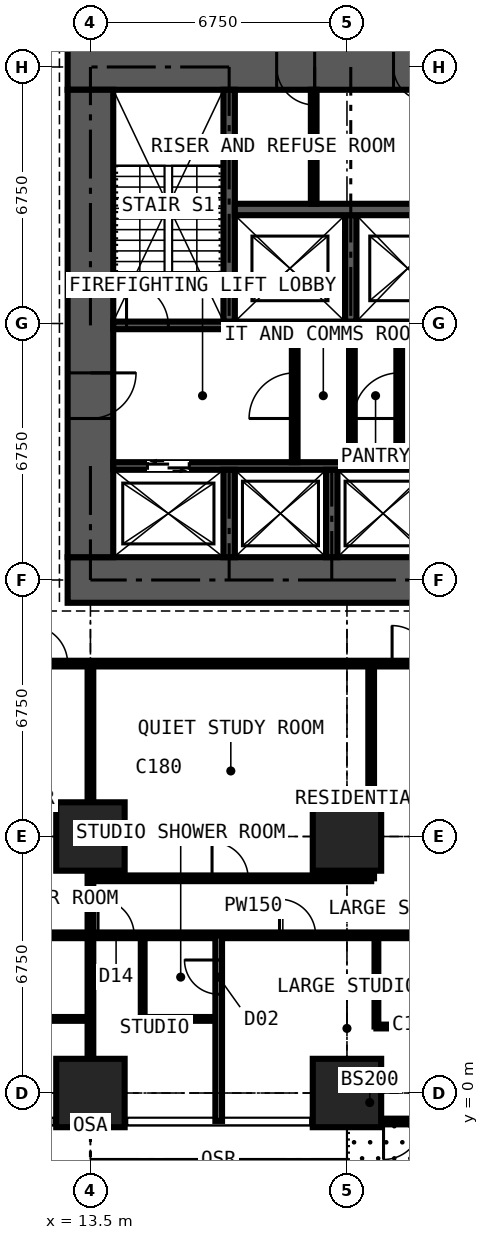
"""IFC4 building model, lengths in metres.
Left out: names, types, materials, properties, quantities, classifications, styles, units other than length and angle.
Written with IfcOpenShell. Run it as: python <this file> out.ifc"""

import sys

from ifc_helpers import new_model, si_unit, direction, frame, frame_2d, origin, origin_2d, place, context, subcontext, project, spatial, rectangle, extrude, element, fill, save


model = new_model("IFC4")
c1 = context("Model", 3, precision=1e-05, world=origin(), true_north=direction((0.0, 1.0)))
c2 = subcontext(c1, "Body", "Model", "MODEL_VIEW")
j1 = project(units=[si_unit("LENGTHUNIT", "METRE"), si_unit("PLANEANGLEUNIT", "RADIAN")], contexts=[c1])
p1 = place(None, origin())
s1 = spatial("IfcSite", under=j1, at=p1, CompositionType="ELEMENT")
p2 = place(p1, origin())
s2 = spatial("IfcBuilding", under=s1, at=p2, CompositionType="ELEMENT")
p3 = place(p2, frame((0.0, 0.0, 50.4)))
s3 = spatial("IfcBuildingStorey", under=s2, at=p3, CompositionType="ELEMENT", Elevation=50.4)
for number, where, z_axis, x_axis in (
    (1, (13.5, 0.0, 0.0), (0.0, 0.0, 1.0), (1.0, 0.0, 0.0)),
    (2, (13.5, 6.75, 0.0), (0.0, 0.0, 1.0), (1.0, 0.0, 0.0)),
    (3, (20.25, 0.0, 0.0), (0.0, 0.0, 1.0), (1.0, 0.0, 0.0)),
    (4, (20.25, 6.75, 0.0), (0.0, 0.0, 1.0), (1.0, 0.0, 0.0)),
):
    element("IfcColumn", number, at=place(p3, frame(where, z_axis=z_axis, x_axis=x_axis)), inside=s3, PredefinedType="COLUMN", context=c2, shape_type="SweptSolid", body=[
        extrude(rectangle(XDim=1.8, YDim=1.8, at=origin_2d()), origin(), (0.0, 0.0, 1.0), 3.6),
    ])
p4 = place(p3, frame((12.9, 13.5, 0.0), z_axis=(0.0, 0.0, 1.0), x_axis=(1.0, 0.0, 0.0)))
e5 = element("IfcWall", 5, at=p4, inside=s3, PredefinedType="SHEAR", context=c2, shape_type="SweptSolid", body=[
    extrude(rectangle(XDim=14.7, YDim=1.2, at=frame_2d((7.35, 0.0))), origin(), (0.0, 0.0, 1.0), 3.6),
])
p5 = place(p3, frame((27.6, 27.0, 0.0), z_axis=(0.0, 0.0, 1.0), x_axis=(-1.0, 0.0, 0.0)))
e6 = element("IfcWall", 6, at=p5, inside=s3, PredefinedType="SHEAR", context=c2, shape_type="SweptSolid", body=[
    extrude(rectangle(XDim=14.7, YDim=1.2, at=frame_2d((7.35, 0.0))), origin(), (0.0, 0.0, 1.0), 3.6),
])
p6 = place(p5, frame((5.225, 0.0, 0.0)))
e7 = element("IfcOpeningElement", 7, at=p6, cuts=e6, PredefinedType="OPENING", context=c2, shape_type="SweptSolid", body=[
    extrude(rectangle(XDim=0.9, YDim=2.2, at=frame_2d((0.45, 1.1))), frame((0.0, 0.61, 0.0), z_axis=(0.0, -1.0, 0.0), x_axis=(1.0, 0.0, 0.0)), (0.0, 0.0, 1.0), 1.22),
])
p7 = place(p5, frame((8.2, 0.0, 0.0)))
e8 = element("IfcOpeningElement", 8, at=p7, cuts=e6, PredefinedType="OPENING", context=c2, shape_type="SweptSolid", body=[
    extrude(rectangle(XDim=1.0, YDim=2.2, at=frame_2d((0.5, 1.1))), frame((0.0, 0.61, 0.0), z_axis=(0.0, -1.0, 0.0), x_axis=(1.0, 0.0, 0.0)), (0.0, 0.0, 1.0), 1.22),
])
p8 = place(p3, frame((13.5, 26.4, 0.0), z_axis=(0.0, 0.0, 1.0), x_axis=(0.0, -1.0, 0.0)))
e9 = element("IfcWall", 9, at=p8, inside=s3, PredefinedType="SHEAR", context=c2, shape_type="SweptSolid", body=[
    extrude(rectangle(XDim=12.3, YDim=1.2, at=frame_2d((6.15, 0.0))), origin(), (0.0, 0.0, 1.0), 3.6),
])
p9 = place(p8, frame((7.45, 0.0, 0.0)))
e10 = element("IfcOpeningElement", 10, at=p9, cuts=e9, PredefinedType="OPENING", context=c2, shape_type="SweptSolid", body=[
    extrude(rectangle(XDim=1.2, YDim=2.2, at=frame_2d((0.6, 1.1))), frame((0.0, 0.61, 0.0), z_axis=(0.0, -1.0, 0.0), x_axis=(1.0, 0.0, 0.0)), (0.0, 0.0, 1.0), 1.22),
])
p10 = place(p3, frame((27.0, -0.75, 0.0), z_axis=(0.0, 0.0, 1.0), x_axis=(-1.0, 0.0, 0.0)))
e11 = element("IfcWall", 11, at=p10, inside=s3, PredefinedType="SOLIDWALL", context=c2, shape_type="SweptSolid", body=[
    extrude(rectangle(XDim=6.75, YDim=0.15, at=frame_2d((3.375, 0.0))), origin(), (0.0, 0.0, 1.0), 3.375),
])
p11 = place(p10, frame((0.962, 0.0, 0.0)))
e12 = element("IfcOpeningElement", 12, at=p11, cuts=e11, PredefinedType="OPENING", context=c2, shape_type="SweptSolid", body=[
    extrude(rectangle(XDim=1.0, YDim=2.2, at=frame_2d((0.5, 1.1))), frame((0.0, 0.085, 0.0), z_axis=(0.0, -1.0, 0.0), x_axis=(1.0, 0.0, 0.0)), (0.0, 0.0, 1.0), 0.17),
])
p12 = place(p10, frame((2.025, 0.0, 0.9)))
e13 = element("IfcOpeningElement", 13, at=p12, cuts=e11, PredefinedType="OPENING", context=c2, shape_type="SweptSolid", body=[
    extrude(rectangle(XDim=1.2, YDim=1.8, at=frame_2d((0.6, 0.9))), frame((0.0, 0.085, 0.0), z_axis=(0.0, -1.0, 0.0), x_axis=(1.0, 0.0, 0.0)), (0.0, 0.0, 1.0), 0.17),
])
p13 = place(p10, frame((4.788, 0.0, 0.0)))
e14 = element("IfcOpeningElement", 14, at=p13, cuts=e11, PredefinedType="OPENING", context=c2, shape_type="SweptSolid", body=[
    extrude(rectangle(XDim=1.0, YDim=2.2, at=frame_2d((0.5, 1.1))), frame((0.0, 0.085, 0.0), z_axis=(0.0, -1.0, 0.0), x_axis=(1.0, 0.0, 0.0)), (0.0, 0.0, 1.0), 0.17),
])
p14 = place(p10, frame((3.525, 0.0, 0.9)))
e15 = element("IfcOpeningElement", 15, at=p14, cuts=e11, PredefinedType="OPENING", context=c2, shape_type="SweptSolid", body=[
    extrude(rectangle(XDim=1.2, YDim=1.8, at=frame_2d((0.6, 0.9))), frame((0.0, 0.085, 0.0), z_axis=(0.0, -1.0, 0.0), x_axis=(1.0, 0.0, 0.0)), (0.0, 0.0, 1.0), 0.17),
])
p15 = place(p3, frame((14.1, 16.5, 0.0), z_axis=(0.0, 0.0, 1.0), x_axis=(1.0, 0.0, 0.0)))
e16 = element("IfcWall", 16, at=p15, inside=s3, PredefinedType="SHEAR", context=c2, shape_type="SweptSolid", body=[
    extrude(rectangle(XDim=12.3, YDim=0.2, at=frame_2d((6.15, 0.0))), origin(), (0.0, 0.0, 1.0), 3.6),
])
p16 = place(p15, frame((0.9, 0.0, 0.0)))
e17 = element("IfcOpeningElement", 17, at=p16, cuts=e16, PredefinedType="OPENING", context=c2, shape_type="SweptSolid", body=[
    extrude(rectangle(XDim=1.1, YDim=2.2, at=frame_2d((0.55, 1.1))), frame((0.0, 0.11, 0.0), z_axis=(0.0, -1.0, 0.0), x_axis=(1.0, 0.0, 0.0)), (0.0, 0.0, 1.0), 0.22),
])
p17 = place(p15, frame((9.5, 0.0, 0.0)))
e18 = element("IfcOpeningElement", 18, at=p17, cuts=e16, PredefinedType="OPENING", context=c2, shape_type="SweptSolid", body=[
    extrude(rectangle(XDim=1.1, YDim=2.2, at=frame_2d((0.55, 1.1))), frame((0.0, 0.11, 0.0), z_axis=(0.0, -1.0, 0.0), x_axis=(1.0, 0.0, 0.0)), (0.0, 0.0, 1.0), 0.22),
])
p18 = place(p3, frame((14.1, 20.2, 0.0), z_axis=(0.0, 0.0, 1.0), x_axis=(1.0, 0.0, 0.0)))
e19 = element("IfcWall", 19, at=p18, inside=s3, PredefinedType="SHEAR", context=c2, shape_type="SweptSolid", body=[
    extrude(rectangle(XDim=12.3, YDim=0.2, at=frame_2d((6.15, 0.0))), origin(), (0.0, 0.0, 1.0), 3.6),
])
p19 = place(p18, frame((0.35, 0.0, 0.0)))
e20 = element("IfcOpeningElement", 20, at=p19, cuts=e19, PredefinedType="OPENING", context=c2, shape_type="SweptSolid", body=[
    extrude(rectangle(XDim=1.1, YDim=2.2, at=frame_2d((0.55, 1.1))), frame((0.0, 0.11, 0.0), z_axis=(0.0, -1.0, 0.0), x_axis=(1.0, 0.0, 0.0)), (0.0, 0.0, 1.0), 0.22),
])
p20 = place(p18, frame((9.75, 0.0, 0.0)))
e21 = element("IfcOpeningElement", 21, at=p20, cuts=e19, PredefinedType="OPENING", context=c2, shape_type="SweptSolid", body=[
    extrude(rectangle(XDim=1.1, YDim=2.2, at=frame_2d((0.55, 1.1))), frame((0.0, 0.11, 0.0), z_axis=(0.0, -1.0, 0.0), x_axis=(1.0, 0.0, 0.0)), (0.0, 0.0, 1.0), 0.22),
])
p21 = place(p3, frame((17.15, 20.3, 0.0), z_axis=(0.0, 0.0, 1.0), x_axis=(0.0, 1.0, 0.0)))
e22 = element("IfcWall", 22, at=p21, inside=s3, PredefinedType="SHEAR", context=c2, shape_type="SweptSolid", body=[
    extrude(rectangle(XDim=6.1, YDim=0.3, at=frame_2d((3.05, 0.0))), origin(), (0.0, 0.0, 1.0), 3.6),
])
p22 = place(p3, frame((20.35, 20.3, 0.0), z_axis=(0.0, 0.0, 1.0), x_axis=(0.0, 1.0, 0.0)))
e23 = element("IfcWall", 23, at=p22, inside=s3, PredefinedType="SHEAR", context=c2, shape_type="SweptSolid", body=[
    extrude(rectangle(XDim=2.8, YDim=0.3, at=frame_2d((1.4, 0.0))), origin(), (0.0, 0.0, 1.0), 3.6),
])
p23 = place(p3, frame((17.3, 23.25, 0.0), z_axis=(0.0, 0.0, 1.0), x_axis=(1.0, 0.0, 0.0)))
e24 = element("IfcWall", 24, at=p23, inside=s3, PredefinedType="SHEAR", context=c2, shape_type="SweptSolid", body=[
    extrude(rectangle(XDim=5.9, YDim=0.3, at=frame_2d((2.95, 0.0))), origin(), (0.0, 0.0, 1.0), 3.6),
])
for number, where, z_axis, x_axis in (
    (25, (17.15, 14.1, 0.0), (0.0, 0.0, 1.0), (0.0, 1.0, 0.0)),
    (26, (19.85, 14.1, 0.0), (0.0, 0.0, 1.0), (0.0, 1.0, 0.0)),
):
    element("IfcWall", number, at=place(p3, frame(where, z_axis=z_axis, x_axis=x_axis)), inside=s3, PredefinedType="SHEAR", context=c2, shape_type="SweptSolid", body=[
        extrude(rectangle(XDim=2.3, YDim=0.3, at=frame_2d((1.15, 0.0))), origin(), (0.0, 0.0, 1.0), 3.6),
    ])
p24 = place(p3, frame((18.875, 16.6, 0.0), z_axis=(0.0, 0.0, 1.0), x_axis=(0.0, 1.0, 0.0)))
e27 = element("IfcWall", 27, at=p24, inside=s3, PredefinedType="PARTITIONING", context=c2, shape_type="SweptSolid", body=[
    extrude(rectangle(XDim=3.5, YDim=0.15, at=frame_2d((1.75, 0.0))), origin(), (0.0, 0.0, 1.0), 3.375),
])
p25 = place(p24, frame((1.15, 0.0, 0.0)))
e28 = element("IfcOpeningElement", 28, at=p25, cuts=e27, PredefinedType="OPENING", context=c2, shape_type="SweptSolid", body=[
    extrude(rectangle(XDim=1.2, YDim=2.2, at=frame_2d((0.6, 1.1))), frame((0.0, 0.085, 0.0), z_axis=(0.0, -1.0, 0.0), x_axis=(1.0, 0.0, 0.0)), (0.0, 0.0, 1.0), 0.17),
])
p26 = place(p3, frame((21.625, 16.6, 0.0), z_axis=(0.0, 0.0, 1.0), x_axis=(0.0, 1.0, 0.0)))
e29 = element("IfcWall", 29, at=p26, inside=s3, PredefinedType="PARTITIONING", context=c2, shape_type="SweptSolid", body=[
    extrude(rectangle(XDim=3.5, YDim=0.15, at=frame_2d((1.75, 0.0))), origin(), (0.0, 0.0, 1.0), 3.375),
])
p27 = place(p26, frame((1.15, 0.0, 0.0)))
e30 = element("IfcOpeningElement", 30, at=p27, cuts=e29, PredefinedType="OPENING", context=c2, shape_type="SweptSolid", body=[
    extrude(rectangle(XDim=1.2, YDim=2.2, at=frame_2d((0.6, 1.1))), frame((0.0, 0.085, 0.0), z_axis=(0.0, -1.0, 0.0), x_axis=(1.0, 0.0, 0.0)), (0.0, 0.0, 1.0), 0.17),
])
p28 = place(p3, frame((20.38, 16.6, 0.0), z_axis=(0.0, 0.0, 1.0), x_axis=(0.0, 1.0, 0.0)))
e31 = element("IfcWall", 31, at=p28, inside=s3, PredefinedType="PARTITIONING", context=c2, shape_type="SweptSolid", body=[
    extrude(rectangle(XDim=3.5, YDim=0.15, at=frame_2d((1.75, 0.0))), origin(), (0.0, 0.0, 1.0), 3.375),
])
p29 = place(p3, frame((19.375, 23.4, 0.0), z_axis=(0.0, 0.0, 1.0), x_axis=(0.0, 1.0, 0.0)))
e32 = element("IfcWall", 32, at=p29, inside=s3, PredefinedType="PARTITIONING", context=c2, shape_type="SweptSolid", body=[
    extrude(rectangle(XDim=3.0, YDim=0.15, at=frame_2d((1.5, 0.0))), origin(), (0.0, 0.0, 1.0), 3.375),
])
p30 = place(p3, frame((6.75, 4.15, 0.0), z_axis=(0.0, 0.0, 1.0), x_axis=(1.0, 0.0, 0.0)))
e33 = element("IfcWall", 33, at=p30, inside=s3, PredefinedType="PARTITIONING", context=c2, shape_type="SweptSolid", body=[
    extrude(rectangle(XDim=23.625, YDim=0.15, at=frame_2d((11.812, 0.0))), origin(), (0.0, 0.0, 1.0), 3.375),
])
p31 = place(p30, frame((0.2, 0.0, 0.0)))
e34 = element("IfcOpeningElement", 34, at=p31, cuts=e33, PredefinedType="OPENING", context=c2, shape_type="SweptSolid", body=[
    extrude(rectangle(XDim=0.95, YDim=2.2, at=frame_2d((0.475, 1.1))), frame((0.0, 0.085, 0.0), z_axis=(0.0, -1.0, 0.0), x_axis=(1.0, 0.0, 0.0)), (0.0, 0.0, 1.0), 0.17),
])
p32 = place(p30, frame((3.625, 0.0, 0.0)))
e35 = element("IfcOpeningElement", 35, at=p32, cuts=e33, PredefinedType="OPENING", context=c2, shape_type="SweptSolid", body=[
    extrude(rectangle(XDim=0.95, YDim=2.2, at=frame_2d((0.475, 1.1))), frame((0.0, 0.085, 0.0), z_axis=(0.0, -1.0, 0.0), x_axis=(1.0, 0.0, 0.0)), (0.0, 0.0, 1.0), 0.17),
])
p33 = place(p30, frame((18.475, 0.0, 0.0)))
e36 = element("IfcOpeningElement", 36, at=p33, cuts=e33, PredefinedType="OPENING", context=c2, shape_type="SweptSolid", body=[
    extrude(rectangle(XDim=0.95, YDim=2.2, at=frame_2d((0.475, 1.1))), frame((0.0, 0.085, 0.0), z_axis=(0.0, -1.0, 0.0), x_axis=(1.0, 0.0, 0.0)), (0.0, 0.0, 1.0), 0.17),
])
p34 = place(p30, frame((11.725, 0.0, 0.0)))
e37 = element("IfcOpeningElement", 37, at=p34, cuts=e33, PredefinedType="OPENING", context=c2, shape_type="SweptSolid", body=[
    extrude(rectangle(XDim=0.95, YDim=2.2, at=frame_2d((0.475, 1.1))), frame((0.0, 0.085, 0.0), z_axis=(0.0, -1.0, 0.0), x_axis=(1.0, 0.0, 0.0)), (0.0, 0.0, 1.0), 0.17),
])
p35 = place(p30, frame((6.95, 0.0, 0.0)))
e38 = element("IfcOpeningElement", 38, at=p35, cuts=e33, PredefinedType="OPENING", context=c2, shape_type="SweptSolid", body=[
    extrude(rectangle(XDim=0.95, YDim=2.2, at=frame_2d((0.475, 1.1))), frame((0.0, 0.085, 0.0), z_axis=(0.0, -1.0, 0.0), x_axis=(1.0, 0.0, 0.0)), (0.0, 0.0, 1.0), 0.17),
])
p36 = place(p3, frame((10.125, 11.3, 0.0), z_axis=(0.0, 0.0, 1.0), x_axis=(1.0, 0.0, 0.0)))
e39 = element("IfcWall", 39, at=p36, inside=s3, PredefinedType="PARTITIONING", context=c2, shape_type="SweptSolid", body=[
    extrude(rectangle(XDim=20.675, YDim=0.15, at=frame_2d((10.337, 0.0))), origin(), (0.0, 0.0, 1.0), 3.375),
])
p37 = place(p36, frame((1.775, 0.0, 0.0)))
e40 = element("IfcOpeningElement", 40, at=p37, cuts=e39, PredefinedType="OPENING", context=c2, shape_type="SweptSolid", body=[
    extrude(rectangle(XDim=1.0, YDim=2.2, at=frame_2d((0.5, 1.1))), frame((0.0, 0.085, 0.0), z_axis=(0.0, -1.0, 0.0), x_axis=(1.0, 0.0, 0.0)), (0.0, 0.0, 1.0), 0.17),
])
p38 = place(p36, frame((11.312, 0.0, 0.0)))
e41 = element("IfcOpeningElement", 41, at=p38, cuts=e39, PredefinedType="OPENING", context=c2, shape_type="SweptSolid", body=[
    extrude(rectangle(XDim=1.0, YDim=2.2, at=frame_2d((0.5, 1.1))), frame((0.0, 0.085, 0.0), z_axis=(0.0, -1.0, 0.0), x_axis=(1.0, 0.0, 0.0)), (0.0, 0.0, 1.0), 0.17),
])
p39 = place(p3, frame((11.5, 1.95, 0.0), z_axis=(0.0, 0.0, 1.0), x_axis=(1.0, 0.0, 0.0)))
e42 = element("IfcWall", 42, at=p39, inside=s3, PredefinedType="PARTITIONING", context=c2, shape_type="SweptSolid", body=[
    extrude(rectangle(XDim=2.0, YDim=0.1, at=frame_2d((1.0, 0.0))), origin(), (0.0, 0.0, 1.0), 3.375),
])
p40 = place(p3, frame((13.5, -0.734, 0.0), z_axis=(0.0, 0.0, 1.0), x_axis=(0.0, 1.0, 0.0)))
e43 = element("IfcWall", 43, at=p40, inside=s3, PredefinedType="PARTITIONING", context=c2, shape_type="SweptSolid", body=[
    extrude(rectangle(XDim=12.034, YDim=0.15, at=frame_2d((6.017, 0.0))), origin(), (0.0, 0.0, 1.0), 2.61),
])
p41 = place(p3, frame((13.5, 5.65, 0.0), z_axis=(0.0, 0.0, 1.0), x_axis=(1.0, 0.0, 0.0)))
e44 = element("IfcWall", 44, at=p41, inside=s3, PredefinedType="PARTITIONING", context=c2, shape_type="SweptSolid", body=[
    extrude(rectangle(XDim=7.387, YDim=0.15, at=frame_2d((3.694, 0.0))), origin(), (0.0, 0.0, 1.0), 3.375),
])
p42 = place(p41, frame((3.2, 0.0, 0.0)))
e45 = element("IfcOpeningElement", 45, at=p42, cuts=e44, PredefinedType="OPENING", context=c2, shape_type="SweptSolid", body=[
    extrude(rectangle(XDim=0.95, YDim=2.2, at=frame_2d((0.475, 1.1))), frame((0.0, 0.085, 0.0), z_axis=(0.0, -1.0, 0.0), x_axis=(1.0, 0.0, 0.0)), (0.0, 0.0, 1.0), 0.17),
])
p43 = place(p3, frame((14.875, 1.95, 0.0), z_axis=(0.0, 0.0, 1.0), x_axis=(0.0, 1.0, 0.0)))
e46 = element("IfcWall", 46, at=p43, inside=s3, PredefinedType="PARTITIONING", context=c2, shape_type="SweptSolid", body=[
    extrude(rectangle(XDim=2.2, YDim=0.1, at=frame_2d((1.1, 0.0))), origin(), (0.0, 0.0, 1.0), 3.375),
])
p44 = place(p3, frame((14.875, 1.95, 0.0), z_axis=(0.0, 0.0, 1.0), x_axis=(1.0, 0.0, 0.0)))
e47 = element("IfcWall", 47, at=p44, inside=s3, PredefinedType="PARTITIONING", context=c2, shape_type="SweptSolid", body=[
    extrude(rectangle(XDim=2.0, YDim=0.1, at=frame_2d((1.0, 0.0))), origin(), (0.0, 0.0, 1.0), 3.375),
])
p45 = place(p3, frame((16.875, -0.734, 0.0), z_axis=(0.0, 0.0, 1.0), x_axis=(0.0, 1.0, 0.0)))
e48 = element("IfcWall", 48, at=p45, inside=s3, PredefinedType="PARTITIONING", context=c2, shape_type="SweptSolid", body=[
    extrude(rectangle(XDim=4.884, YDim=0.175, at=frame_2d((2.442, 0.0))), origin(), (0.0, 0.0, 1.0), 3.375),
])
p46 = place(p45, frame((3.334, 0.0, 0.0)))
e49 = element("IfcOpeningElement", 49, at=p46, cuts=e48, PredefinedType="OPENING", context=c2, shape_type="SweptSolid", body=[
    extrude(rectangle(XDim=0.9, YDim=2.2, at=frame_2d((0.45, 1.1))), frame((0.0, 0.097, 0.0), z_axis=(0.0, -1.0, 0.0), x_axis=(1.0, 0.0, 0.0)), (0.0, 0.0, 1.0), 0.195),
])
p47 = place(p3, frame((20.887, 5.65, 0.0), z_axis=(0.0, 0.0, 1.0), x_axis=(0.0, 1.0, 0.0)))
e50 = element("IfcWall", 50, at=p47, inside=s3, PredefinedType="PARTITIONING", context=c2, shape_type="SweptSolid", body=[
    extrude(rectangle(XDim=5.65, YDim=0.15, at=frame_2d((2.825, 0.0))), origin(), (0.0, 0.0, 1.0), 3.375),
])
p48 = place(p3, frame((21.025, 1.75, 0.0), z_axis=(0.0, 0.0, 1.0), x_axis=(0.0, 1.0, 0.0)))
e51 = element("IfcWall", 51, at=p48, inside=s3, PredefinedType="PARTITIONING", context=c2, shape_type="SweptSolid", body=[
    extrude(rectangle(XDim=2.4, YDim=0.1, at=frame_2d((1.2, 0.0))), origin(), (0.0, 0.0, 1.0), 3.375),
])
p49 = place(p3, frame((21.025, 1.75, 0.0), z_axis=(0.0, 0.0, 1.0), x_axis=(1.0, 0.0, 0.0)))
e52 = element("IfcWall", 52, at=p49, inside=s3, PredefinedType="PARTITIONING", context=c2, shape_type="SweptSolid", body=[
    extrude(rectangle(XDim=2.6, YDim=0.1, at=frame_2d((1.3, 0.0))), origin(), (0.0, 0.0, 1.0), 3.375),
])
p50 = place(p13, origin())
e53 = element("IfcDoor", 53, at=p50, inside=s3, OperationType="SINGLE_SWING_RIGHT", PredefinedType="DOOR", context=c2, shape_type="SweptSolid", body=[
    extrude(rectangle(XDim=1.0, YDim=2.2, at=frame_2d((0.5, 1.1))), frame((0.0, 0.025, 0.0), z_axis=(0.0, -1.0, 0.0), x_axis=(1.0, 0.0, 0.0)), (0.0, 0.0, 1.0), 0.05),
])
fill(e14, e53)
p51 = place(p16, origin())
e54 = element("IfcDoor", 54, at=p51, inside=s3, OperationType="DOUBLE_DOOR_SLIDING", PredefinedType="DOOR", context=c2, shape_type="SweptSolid", body=[
    extrude(rectangle(XDim=1.1, YDim=2.2, at=frame_2d((0.55, 1.1))), frame((0.0, 0.025, 0.0), z_axis=(0.0, -1.0, 0.0), x_axis=(1.0, 0.0, 0.0)), (0.0, 0.0, 1.0), 0.05),
])
fill(e17, e54)
p52 = place(p9, origin())
e55 = element("IfcDoor", 55, at=p52, inside=s3, OperationType="DOUBLE_DOOR_SINGLE_SWING", PredefinedType="DOOR", context=c2, shape_type="SweptSolid", body=[
    extrude(rectangle(XDim=1.2, YDim=2.2, at=frame_2d((0.6, 1.1))), frame((0.0, 0.025, 0.0), z_axis=(0.0, -1.0, 0.0), x_axis=(1.0, 0.0, 0.0)), (0.0, 0.0, 1.0), 0.05),
])
fill(e10, e55)
p53 = place(p25, origin())
e56 = element("IfcDoor", 56, at=p53, inside=s3, OperationType="DOUBLE_DOOR_SINGLE_SWING", PredefinedType="DOOR", context=c2, shape_type="SweptSolid", body=[
    extrude(rectangle(XDim=1.2, YDim=2.2, at=frame_2d((0.6, 1.1))), frame((0.0, 0.025, 0.0), z_axis=(0.0, -1.0, 0.0), x_axis=(1.0, 0.0, 0.0)), (0.0, 0.0, 1.0), 0.05),
])
fill(e28, e56)
p54 = place(p27, origin())
e57 = element("IfcDoor", 57, at=p54, inside=s3, OperationType="DOUBLE_DOOR_SINGLE_SWING", PredefinedType="DOOR", context=c2, shape_type="SweptSolid", body=[
    extrude(rectangle(XDim=1.2, YDim=2.2, at=frame_2d((0.6, 1.1))), frame((0.0, 0.025, 0.0), z_axis=(0.0, -1.0, 0.0), x_axis=(1.0, 0.0, 0.0)), (0.0, 0.0, 1.0), 0.05),
])
fill(e30, e57)
p55 = place(p6, origin())
e58 = element("IfcDoor", 58, at=p55, inside=s3, OperationType="SINGLE_SWING_LEFT", PredefinedType="DOOR", context=c2, shape_type="SweptSolid", body=[
    extrude(rectangle(XDim=0.9, YDim=2.2, at=frame_2d((0.45, 1.1))), frame((0.0, 0.4, 0.0), z_axis=(0.0, -1.0, 0.0), x_axis=(1.0, 0.0, 0.0)), (0.0, 0.0, 1.0), 0.8),
])
fill(e7, e58)
p56 = place(p7, origin())
e59 = element("IfcDoor", 59, at=p56, inside=s3, OperationType="SINGLE_SWING_LEFT", PredefinedType="DOOR", context=c2, shape_type="SweptSolid", body=[
    extrude(rectangle(XDim=1.0, YDim=2.2, at=frame_2d((0.5, 1.1))), frame((0.0, 0.025, 0.0), z_axis=(0.0, -1.0, 0.0), x_axis=(1.0, 0.0, 0.0)), (0.0, 0.0, 1.0), 0.05),
])
fill(e8, e59)
p57 = place(p19, origin())
e60 = element("IfcDoor", 60, at=p57, inside=s3, OperationType="SINGLE_SWING_LEFT", PredefinedType="DOOR", context=c2, shape_type="SweptSolid", body=[
    extrude(rectangle(XDim=1.1, YDim=2.2, at=frame_2d((0.55, 1.1))), frame((0.0, 0.025, 0.0), z_axis=(0.0, -1.0, 0.0), x_axis=(1.0, 0.0, 0.0)), (0.0, 0.0, 1.0), 0.05),
])
fill(e20, e60)
p58 = place(p37, origin())
e61 = element("IfcDoor", 61, at=p58, inside=s3, OperationType="SINGLE_SWING_LEFT", PredefinedType="DOOR", context=c2, shape_type="SweptSolid", body=[
    extrude(rectangle(XDim=1.0, YDim=2.2, at=frame_2d((0.5, 1.1))), frame((0.0, 0.025, 0.0), z_axis=(0.0, -1.0, 0.0), x_axis=(1.0, 0.0, 0.0)), (0.0, 0.0, 1.0), 0.05),
])
fill(e40, e61)
p59 = place(p34, origin())
e62 = element("IfcDoor", 62, at=p59, inside=s3, OperationType="SINGLE_SWING_LEFT", PredefinedType="DOOR", context=c2, shape_type="SweptSolid", body=[
    extrude(rectangle(XDim=0.95, YDim=2.2, at=frame_2d((0.475, 1.1))), frame((0.0, 0.025, 0.0), z_axis=(0.0, -1.0, 0.0), x_axis=(1.0, 0.0, 0.0)), (0.0, 0.0, 1.0), 0.05),
])
fill(e37, e62)
p60 = place(p35, origin())
e63 = element("IfcDoor", 63, at=p60, inside=s3, OperationType="SINGLE_SWING_LEFT", PredefinedType="DOOR", context=c2, shape_type="SweptSolid", body=[
    extrude(rectangle(XDim=0.95, YDim=2.2, at=frame_2d((0.475, 1.1))), frame((0.0, 0.025, 0.0), z_axis=(0.0, -1.0, 0.0), x_axis=(1.0, 0.0, 0.0)), (0.0, 0.0, 1.0), 0.05),
])
fill(e38, e63)
p61 = place(p46, origin())
e64 = element("IfcDoor", 64, at=p61, inside=s3, OperationType="SINGLE_SWING_RIGHT", PredefinedType="DOOR", context=c2, shape_type="SweptSolid", body=[
    extrude(rectangle(XDim=0.9, YDim=2.2, at=frame_2d((0.45, 1.1))), frame((0.0, 0.025, 0.0), z_axis=(0.0, -1.0, 0.0), x_axis=(1.0, 0.0, 0.0)), (0.0, 0.0, 1.0), 0.05),
])
fill(e49, e64)
p62 = place(p38, origin())
e65 = element("IfcDoor", 65, at=p62, inside=s3, OperationType="SINGLE_SWING_LEFT", PredefinedType="DOOR", context=c2, shape_type="SweptSolid", body=[
    extrude(rectangle(XDim=1.0, YDim=2.2, at=frame_2d((0.5, 1.1))), frame((0.0, 0.025, 0.0), z_axis=(0.0, -1.0, 0.0), x_axis=(1.0, 0.0, 0.0)), (0.0, 0.0, 1.0), 0.05),
])
fill(e41, e65)
p63 = place(p42, origin())
e66 = element("IfcDoor", 66, at=p63, inside=s3, OperationType="SINGLE_SWING_LEFT", PredefinedType="DOOR", context=c2, shape_type="SweptSolid", body=[
    extrude(rectangle(XDim=0.95, YDim=2.2, at=frame_2d((0.475, 1.1))), frame((0.0, 0.025, 0.0), z_axis=(0.0, -1.0, 0.0), x_axis=(1.0, 0.0, 0.0)), (0.0, 0.0, 1.0), 0.05),
])
fill(e45, e66)
save(model, sys.argv[1])
